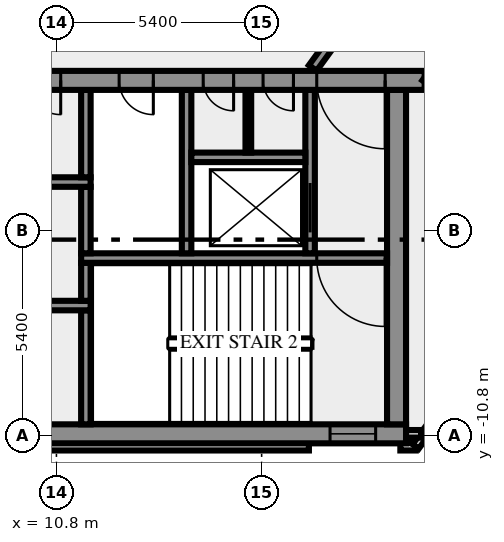
"""IFC4 building model, lengths in metres.
Left out: names, types, materials, properties, quantities, classifications, styles, units other than length and angle.
Written with IfcOpenShell. Run it as: python <this file> out.ifc"""

import sys

from ifc_helpers import new_model, si_unit, direction, frame, frame_2d, origin, place, context, subcontext, project, spatial, rectangle, extrude, element, fill, save


model = new_model("IFC4")
c1 = context("Model", 3, precision=1e-05, world=origin(), true_north=direction((0.0, 1.0)))
c2 = subcontext(c1, "Body", "Model", "MODEL_VIEW")
j1 = project(units=[si_unit("LENGTHUNIT", "METRE"), si_unit("PLANEANGLEUNIT", "RADIAN")], contexts=[c1])
p1 = place(None, origin())
s1 = spatial("IfcSite", under=j1, at=p1, CompositionType="ELEMENT")
p2 = place(p1, origin())
s2 = spatial("IfcBuilding", under=s1, at=p2, CompositionType="ELEMENT")
p3 = place(p2, frame((0.0, 0.0, 293.0)))
s3 = spatial("IfcBuildingStorey", under=s2, at=p3, CompositionType="ELEMENT", Elevation=293.0)
p4 = place(p3, frame((-17.444, -11.088, 0.0), z_axis=(0.0, 0.0, 1.0), x_axis=(1.0, 0.0, 0.0)))
e1 = element("IfcWall", 1, at=p4, inside=s3, PredefinedType="SOLIDWALL", context=c2, shape_type="SweptSolid", body=[
    extrude(rectangle(XDim=34.888, YDim=0.2, at=frame_2d((17.444, 0.0))), origin(), (0.0, 0.0, 1.0), 3.65),
])
p5 = place(p3, frame((19.85, -11.088, 0.0), z_axis=(0.0, 0.0, 1.0), x_axis=(1.0, 0.0, 0.0)))
e2 = element("IfcWall", 2, at=p5, inside=s3, PredefinedType="SOLIDWALL", context=c2, shape_type="SweptSolid", body=[
    extrude(rectangle(XDim=0.406, YDim=0.2, at=frame_2d((0.203, 0.0))), origin(), (0.0, 0.0, 1.0), 3.65),
])
p6 = place(p3, frame((20.253, -11.083, 0.0), z_axis=(0.0, 0.0, 1.0), x_axis=(0.587766567315, 0.809030569476, 0.0)))
e3 = element("IfcWall", 3, at=p6, inside=s3, PredefinedType="SOLIDWALL", context=c2, shape_type="SweptSolid", body=[
    extrude(rectangle(XDim=2.688, YDim=0.2, at=frame_2d((1.344, 0.0))), origin(), (0.0, 0.0, 1.0), 3.65),
])
p7 = place(p3, frame((19.98, -10.75, 0.0), z_axis=(0.0, 0.0, 1.0), x_axis=(1.0, 0.0, 0.0)))
e4 = element("IfcWall", 4, at=p7, inside=s3, PredefinedType="SOLIDWALL", context=c2, shape_type="SweptSolid", body=[
    extrude(rectangle(XDim=0.417, YDim=0.2, at=frame_2d((0.208, 0.0))), origin(), (0.0, 0.0, 1.0), 3.65),
])
p8 = place(p3, frame((-20.0, -10.75, 0.0), z_axis=(0.0, 0.0, 1.0), x_axis=(1.0, 0.0, 0.0)))
e5 = element("IfcWall", 5, at=p8, inside=s3, PredefinedType="SHEAR", context=c2, shape_type="SweptSolid", body=[
    extrude(rectangle(XDim=40.0, YDim=0.5, at=frame_2d((20.0, 0.0))), origin(), (0.0, 0.0, 1.0), 3.65),
])
p9 = place(p8, frame((0.8, 0.0, 1.0)))
e6 = element("IfcOpeningElement", 6, at=p9, cuts=e5, PredefinedType="OPENING", context=c2, shape_type="SweptSolid", body=[
    extrude(rectangle(XDim=1.2, YDim=1.2, at=frame_2d((0.6, 0.6))), frame((0.0, 0.26, 0.0), z_axis=(0.0, -1.0, 0.0), x_axis=(1.0, 0.0, 0.0)), (0.0, 0.0, 1.0), 0.52),
])
p10 = place(p8, frame((38.0, 0.0, 1.0)))
e7 = element("IfcOpeningElement", 7, at=p10, cuts=e5, PredefinedType="OPENING", context=c2, shape_type="SweptSolid", body=[
    extrude(rectangle(XDim=1.2, YDim=1.2, at=frame_2d((0.6, 0.6))), frame((0.0, 0.26, 0.0), z_axis=(0.0, -1.0, 0.0), x_axis=(1.0, 0.0, 0.0)), (0.0, 0.0, 1.0), 0.52),
])
p11 = place(p3, frame((11.575, -10.5, 0.0), z_axis=(0.0, 0.0, 1.0), x_axis=(0.0, 1.0, 0.0)))
e8 = element("IfcWall", 8, at=p11, inside=s3, PredefinedType="SHEAR", context=c2, shape_type="SweptSolid", body=[
    extrude(rectangle(XDim=3.0, YDim=0.25, at=frame_2d((1.5, 0.0))), origin(), (0.0, 0.0, 1.0), 3.65),
])
p12 = place(p3, frame((19.75, -10.5, 0.0), z_axis=(0.0, 0.0, 1.0), x_axis=(0.0, 1.0, 0.0)))
e9 = element("IfcWall", 9, at=p12, inside=s3, PredefinedType="SHEAR", context=c2, shape_type="SweptSolid", body=[
    extrude(rectangle(XDim=8.8, YDim=0.5, at=frame_2d((4.4, 0.0))), origin(), (0.0, 0.0, 1.0), 3.65),
])
p13 = place(p3, frame((11.7, -7.375, 0.0), z_axis=(0.0, 0.0, 1.0), x_axis=(-1.0, 0.0, 0.0)))
e10 = element("IfcWall", 10, at=p13, inside=s3, PredefinedType="SHEAR", context=c2, shape_type="SweptSolid", body=[
    extrude(rectangle(XDim=23.4, YDim=0.25, at=frame_2d((11.7, 0.0))), origin(), (0.0, 0.0, 1.0), 3.65),
])
p14 = place(p13, frame((22.225, 0.0, 0.0)))
e11 = element("IfcOpeningElement", 11, at=p14, cuts=e10, PredefinedType="OPENING", context=c2, shape_type="SweptSolid", body=[
    extrude(rectangle(XDim=0.8, YDim=2.1, at=frame_2d((0.4, 1.05))), frame((0.0, 0.135, 0.0), z_axis=(0.0, -1.0, 0.0), x_axis=(1.0, 0.0, 0.0)), (0.0, 0.0, 1.0), 0.27),
])
p15 = place(p13, frame((20.2, 0.0, 0.0)))
e12 = element("IfcOpeningElement", 12, at=p15, cuts=e10, PredefinedType="OPENING", context=c2, shape_type="SweptSolid", body=[
    extrude(rectangle(XDim=1.1, YDim=2.1, at=frame_2d((0.55, 1.05))), frame((0.0, 0.135, 0.0), z_axis=(0.0, -1.0, 0.0), x_axis=(1.0, 0.0, 0.0)), (0.0, 0.0, 1.0), 0.27),
])
p16 = place(p13, frame((17.7, 0.0, 0.0)))
e13 = element("IfcOpeningElement", 13, at=p16, cuts=e10, PredefinedType="OPENING", context=c2, shape_type="SweptSolid", body=[
    extrude(rectangle(XDim=1.1, YDim=2.1, at=frame_2d((0.55, 1.05))), frame((0.0, 0.135, 0.0), z_axis=(0.0, -1.0, 0.0), x_axis=(1.0, 0.0, 0.0)), (0.0, 0.0, 1.0), 0.27),
])
p17 = place(p13, frame((15.975, 0.0, 0.0)))
e14 = element("IfcOpeningElement", 14, at=p17, cuts=e10, PredefinedType="OPENING", context=c2, shape_type="SweptSolid", body=[
    extrude(rectangle(XDim=0.8, YDim=2.1, at=frame_2d((0.4, 1.05))), frame((0.0, 0.135, 0.0), z_axis=(0.0, -1.0, 0.0), x_axis=(1.0, 0.0, 0.0)), (0.0, 0.0, 1.0), 0.27),
])
p18 = place(p13, frame((14.5, 0.0, 0.0)))
e15 = element("IfcOpeningElement", 15, at=p18, cuts=e10, PredefinedType="OPENING", context=c2, shape_type="SweptSolid", body=[
    extrude(rectangle(XDim=0.9, YDim=2.1, at=frame_2d((0.45, 1.05))), frame((0.0, 0.135, 0.0), z_axis=(0.0, -1.0, 0.0), x_axis=(1.0, 0.0, 0.0)), (0.0, 0.0, 1.0), 0.27),
])
p19 = place(p13, frame((12.95, 0.0, 0.0)))
e16 = element("IfcOpeningElement", 16, at=p19, cuts=e10, PredefinedType="OPENING", context=c2, shape_type="SweptSolid", body=[
    extrude(rectangle(XDim=0.9, YDim=2.1, at=frame_2d((0.45, 1.05))), frame((0.0, 0.135, 0.0), z_axis=(0.0, -1.0, 0.0), x_axis=(1.0, 0.0, 0.0)), (0.0, 0.0, 1.0), 0.27),
])
p20 = place(p13, frame((11.475, 0.0, 0.0)))
e17 = element("IfcOpeningElement", 17, at=p20, cuts=e10, PredefinedType="OPENING", context=c2, shape_type="SweptSolid", body=[
    extrude(rectangle(XDim=0.9, YDim=2.1, at=frame_2d((0.45, 1.05))), frame((0.0, 0.135, 0.0), z_axis=(0.0, -1.0, 0.0), x_axis=(1.0, 0.0, 0.0)), (0.0, 0.0, 1.0), 0.27),
])
p21 = place(p13, frame((10.45, 0.0, 0.0)))
e18 = element("IfcOpeningElement", 18, at=p21, cuts=e10, PredefinedType="OPENING", context=c2, shape_type="SweptSolid", body=[
    extrude(rectangle(XDim=0.5, YDim=2.1, at=frame_2d((0.25, 1.05))), frame((0.0, 0.135, 0.0), z_axis=(0.0, -1.0, 0.0), x_axis=(1.0, 0.0, 0.0)), (0.0, 0.0, 1.0), 0.27),
])
p22 = place(p13, frame((7.987, 0.0, 0.0)))
e19 = element("IfcOpeningElement", 19, at=p22, cuts=e10, PredefinedType="OPENING", context=c2, shape_type="SweptSolid", body=[
    extrude(rectangle(XDim=0.9, YDim=2.1, at=frame_2d((0.45, 1.05))), frame((0.0, 0.135, 0.0), z_axis=(0.0, -1.0, 0.0), x_axis=(1.0, 0.0, 0.0)), (0.0, 0.0, 1.0), 0.27),
])
p23 = place(p13, frame((3.012, 0.0, 0.0)))
e20 = element("IfcOpeningElement", 20, at=p23, cuts=e10, PredefinedType="OPENING", context=c2, shape_type="SweptSolid", body=[
    extrude(rectangle(XDim=0.9, YDim=2.1, at=frame_2d((0.45, 1.05))), frame((0.0, 0.135, 0.0), z_axis=(0.0, -1.0, 0.0), x_axis=(1.0, 0.0, 0.0)), (0.0, 0.0, 1.0), 0.27),
])
p24 = place(p3, frame((11.575, -7.25, 0.0), z_axis=(0.0, 0.0, 1.0), x_axis=(0.0, 1.0, 0.0)))
e21 = element("IfcWall", 21, at=p24, inside=s3, PredefinedType="SHEAR", context=c2, shape_type="SweptSolid", body=[
    extrude(rectangle(XDim=1.0, YDim=0.25, at=frame_2d((0.5, 0.0))), origin(), (0.0, 0.0, 1.0), 3.65),
])
p25 = place(p3, frame((19.5, -6.125, 0.0), z_axis=(0.0, 0.0, 1.0), x_axis=(-1.0, 0.0, 0.0)))
e22 = element("IfcWall", 22, at=p25, inside=s3, PredefinedType="SHEAR", context=c2, shape_type="SweptSolid", body=[
    extrude(rectangle(XDim=8.05, YDim=0.25, at=frame_2d((4.025, 0.0))), origin(), (0.0, 0.0, 1.0), 3.65),
])
p26 = place(p25, frame((0.05, 0.0, 0.0)))
e23 = element("IfcOpeningElement", 23, at=p26, cuts=e22, PredefinedType="OPENING", context=c2, shape_type="SweptSolid", body=[
    extrude(rectangle(XDim=1.8, YDim=2.1, at=frame_2d((0.9, 1.05))), frame((0.0, 0.135, 0.0), z_axis=(0.0, -1.0, 0.0), x_axis=(1.0, 0.0, 0.0)), (0.0, 0.0, 1.0), 0.27),
])
p27 = place(p3, frame((11.575, -6.0, 0.0), z_axis=(0.0, 0.0, 1.0), x_axis=(0.0, 1.0, 0.0)))
e24 = element("IfcWall", 24, at=p27, inside=s3, PredefinedType="SHEAR", context=c2, shape_type="SweptSolid", body=[
    extrude(rectangle(XDim=1.75, YDim=0.25, at=frame_2d((0.875, 0.0))), origin(), (0.0, 0.0, 1.0), 3.65),
])
p28 = place(p3, frame((14.225, -6.0, 0.0), z_axis=(0.0, 0.0, 1.0), x_axis=(0.0, 1.0, 0.0)))
e25 = element("IfcWall", 25, at=p28, inside=s3, PredefinedType="SHEAR", context=c2, shape_type="SweptSolid", body=[
    extrude(rectangle(XDim=4.3, YDim=0.25, at=frame_2d((2.15, 0.0))), origin(), (0.0, 0.0, 1.0), 3.65),
])
p29 = place(p3, frame((17.475, -6.0, 0.0), z_axis=(0.0, 0.0, 1.0), x_axis=(0.0, 1.0, 0.0)))
e26 = element("IfcWall", 26, at=p29, inside=s3, PredefinedType="SHEAR", context=c2, shape_type="SweptSolid", body=[
    extrude(rectangle(XDim=4.3, YDim=0.25, at=frame_2d((2.15, 0.0))), origin(), (0.0, 0.0, 1.0), 3.65),
])
p30 = place(p29, frame((0.55, 0.0, 0.0)))
e27 = element("IfcOpeningElement", 27, at=p30, cuts=e26, PredefinedType="OPENING", context=c2, shape_type="SweptSolid", body=[
    extrude(rectangle(XDim=1.3, YDim=2.1, at=frame_2d((0.65, 1.05))), frame((0.0, 0.135, 0.0), z_axis=(0.0, -1.0, 0.0), x_axis=(1.0, 0.0, 0.0)), (0.0, 0.0, 1.0), 0.27),
])
p31 = place(p3, frame((-0.6, -4.125, 0.0), z_axis=(0.0, 0.0, 1.0), x_axis=(1.0, 0.0, 0.0)))
e28 = element("IfcWall", 28, at=p31, inside=s3, PredefinedType="SHEAR", context=c2, shape_type="SweptSolid", body=[
    extrude(rectangle(XDim=12.3, YDim=0.25, at=frame_2d((6.15, 0.0))), origin(), (0.0, 0.0, 1.0), 3.65),
])
p32 = place(p31, frame((2.75, 0.0, 0.0)))
e29 = element("IfcOpeningElement", 29, at=p32, cuts=e28, PredefinedType="OPENING", context=c2, shape_type="SweptSolid", body=[
    extrude(rectangle(XDim=1.3, YDim=2.1, at=frame_2d((0.65, 1.05))), frame((0.0, 0.135, 0.0), z_axis=(0.0, -1.0, 0.0), x_axis=(1.0, 0.0, 0.0)), (0.0, 0.0, 1.0), 0.27),
])
p33 = place(p3, frame((11.575, -4.0, 0.0), z_axis=(0.0, 0.0, 1.0), x_axis=(0.0, 1.0, 0.0)))
e30 = element("IfcWall", 30, at=p33, inside=s3, PredefinedType="SHEAR", context=c2, shape_type="SweptSolid", body=[
    extrude(rectangle(XDim=2.3, YDim=0.25, at=frame_2d((1.15, 0.0))), origin(), (0.0, 0.0, 1.0), 3.65),
])
p34 = place(p3, frame((14.35, -3.475, 0.0), z_axis=(0.0, 0.0, 1.0), x_axis=(1.0, 0.0, 0.0)))
e31 = element("IfcWall", 31, at=p34, inside=s3, PredefinedType="SHEAR", context=c2, shape_type="SweptSolid", body=[
    extrude(rectangle(XDim=3.0, YDim=0.25, at=frame_2d((1.5, 0.0))), origin(), (0.0, 0.0, 1.0), 3.65),
])
p35 = place(p3, frame((15.85, -3.35, 0.0), z_axis=(0.0, 0.0, 1.0), x_axis=(0.0, 1.0, 0.0)))
e32 = element("IfcWall", 32, at=p35, inside=s3, PredefinedType="PARTITIONING", context=c2, shape_type="SweptSolid", body=[
    extrude(rectangle(XDim=1.65, YDim=0.15, at=frame_2d((0.825, 0.0))), origin(), (0.0, 0.0, 1.0), 3.65),
])
p36 = place(p3, frame((20.49, -1.45, 0.0), z_axis=(0.0, 0.0, 1.0), x_axis=(-1.0, 0.0, 0.0)))
e33 = element("IfcWall", 33, at=p36, inside=s3, PredefinedType="SHEAR", context=c2, shape_type="SweptSolid", body=[
    extrude(rectangle(XDim=40.98, YDim=0.5, at=frame_2d((20.49, 0.0))), origin(), (0.0, 0.0, 1.0), 3.65),
])
p37 = place(p36, frame((38.14, 0.0, 0.0)))
e34 = element("IfcOpeningElement", 34, at=p37, cuts=e33, PredefinedType="OPENING", context=c2, shape_type="SweptSolid", body=[
    extrude(rectangle(XDim=1.8, YDim=2.1, at=frame_2d((0.9, 1.05))), frame((0.0, 0.26, 0.0), z_axis=(0.0, -1.0, 0.0), x_axis=(1.0, 0.0, 0.0)), (0.0, 0.0, 1.0), 0.52),
])
p38 = place(p36, frame((35.89, 0.0, 0.0)))
e35 = element("IfcOpeningElement", 35, at=p38, cuts=e33, PredefinedType="OPENING", context=c2, shape_type="SweptSolid", body=[
    extrude(rectangle(XDim=0.9, YDim=2.1, at=frame_2d((0.45, 1.05))), frame((0.0, 0.26, 0.0), z_axis=(0.0, -1.0, 0.0), x_axis=(1.0, 0.0, 0.0)), (0.0, 0.0, 1.0), 0.52),
])
p39 = place(p36, frame((32.94, 0.0, 0.0)))
e36 = element("IfcOpeningElement", 36, at=p39, cuts=e33, PredefinedType="OPENING", context=c2, shape_type="SweptSolid", body=[
    extrude(rectangle(XDim=0.9, YDim=2.1, at=frame_2d((0.45, 1.05))), frame((0.0, 0.26, 0.0), z_axis=(0.0, -1.0, 0.0), x_axis=(1.0, 0.0, 0.0)), (0.0, 0.0, 1.0), 0.52),
])
p40 = place(p36, frame((31.015, 0.0, 0.0)))
e37 = element("IfcOpeningElement", 37, at=p40, cuts=e33, PredefinedType="OPENING", context=c2, shape_type="SweptSolid", body=[
    extrude(rectangle(XDim=0.8, YDim=2.1, at=frame_2d((0.4, 1.05))), frame((0.0, 0.26, 0.0), z_axis=(0.0, -1.0, 0.0), x_axis=(1.0, 0.0, 0.0)), (0.0, 0.0, 1.0), 0.52),
])
p41 = place(p36, frame((24.765, 0.0, 0.0)))
e38 = element("IfcOpeningElement", 38, at=p41, cuts=e33, PredefinedType="OPENING", context=c2, shape_type="SweptSolid", body=[
    extrude(rectangle(XDim=0.8, YDim=2.1, at=frame_2d((0.4, 1.05))), frame((0.0, 0.26, 0.0), z_axis=(0.0, -1.0, 0.0), x_axis=(1.0, 0.0, 0.0)), (0.0, 0.0, 1.0), 0.52),
])
p42 = place(p36, frame((21.765, 0.0, 0.0)))
e39 = element("IfcOpeningElement", 39, at=p42, cuts=e33, PredefinedType="OPENING", context=c2, shape_type="SweptSolid", body=[
    extrude(rectangle(XDim=2.0, YDim=2.1, at=frame_2d((1.0, 1.05))), frame((0.0, 0.26, 0.0), z_axis=(0.0, -1.0, 0.0), x_axis=(1.0, 0.0, 0.0)), (0.0, 0.0, 1.0), 0.52),
])
p43 = place(p36, frame((15.202, 0.0, 0.0)))
e40 = element("IfcOpeningElement", 40, at=p43, cuts=e33, PredefinedType="OPENING", context=c2, shape_type="SweptSolid", body=[
    extrude(rectangle(XDim=0.9, YDim=2.1, at=frame_2d((0.45, 1.05))), frame((0.0, 0.26, 0.0), z_axis=(0.0, -1.0, 0.0), x_axis=(1.0, 0.0, 0.0)), (0.0, 0.0, 1.0), 0.52),
])
p44 = place(p36, frame((13.54, 0.0, 0.0)))
e41 = element("IfcOpeningElement", 41, at=p44, cuts=e33, PredefinedType="OPENING", context=c2, shape_type="SweptSolid", body=[
    extrude(rectangle(XDim=0.9, YDim=2.1, at=frame_2d((0.45, 1.05))), frame((0.0, 0.26, 0.0), z_axis=(0.0, -1.0, 0.0), x_axis=(1.0, 0.0, 0.0)), (0.0, 0.0, 1.0), 0.52),
])
p45 = place(p36, frame((11.64, 0.0, 0.0)))
e42 = element("IfcOpeningElement", 42, at=p45, cuts=e33, PredefinedType="OPENING", context=c2, shape_type="SweptSolid", body=[
    extrude(rectangle(XDim=0.9, YDim=2.1, at=frame_2d((0.45, 1.05))), frame((0.0, 0.26, 0.0), z_axis=(0.0, -1.0, 0.0), x_axis=(1.0, 0.0, 0.0)), (0.0, 0.0, 1.0), 0.52),
])
p46 = place(p36, frame((9.577, 0.0, 0.0)))
e43 = element("IfcOpeningElement", 43, at=p46, cuts=e33, PredefinedType="OPENING", context=c2, shape_type="SweptSolid", body=[
    extrude(rectangle(XDim=0.9, YDim=2.1, at=frame_2d((0.45, 1.05))), frame((0.0, 0.26, 0.0), z_axis=(0.0, -1.0, 0.0), x_axis=(1.0, 0.0, 0.0)), (0.0, 0.0, 1.0), 0.52),
])
p47 = place(p36, frame((7.14, 0.0, 0.0)))
e44 = element("IfcOpeningElement", 44, at=p47, cuts=e33, PredefinedType="OPENING", context=c2, shape_type="SweptSolid", body=[
    extrude(rectangle(XDim=0.9, YDim=2.1, at=frame_2d((0.45, 1.05))), frame((0.0, 0.26, 0.0), z_axis=(0.0, -1.0, 0.0), x_axis=(1.0, 0.0, 0.0)), (0.0, 0.0, 1.0), 0.52),
])
p48 = place(p36, frame((5.028, 0.0, 0.0)))
e45 = element("IfcOpeningElement", 45, at=p48, cuts=e33, PredefinedType="OPENING", context=c2, shape_type="SweptSolid", body=[
    extrude(rectangle(XDim=0.8, YDim=2.1, at=frame_2d((0.4, 1.05))), frame((0.0, 0.26, 0.0), z_axis=(0.0, -1.0, 0.0), x_axis=(1.0, 0.0, 0.0)), (0.0, 0.0, 1.0), 0.52),
])
p49 = place(p36, frame((3.452, 0.0, 0.0)))
e46 = element("IfcOpeningElement", 46, at=p49, cuts=e33, PredefinedType="OPENING", context=c2, shape_type="SweptSolid", body=[
    extrude(rectangle(XDim=0.8, YDim=2.1, at=frame_2d((0.4, 1.05))), frame((0.0, 0.26, 0.0), z_axis=(0.0, -1.0, 0.0), x_axis=(1.0, 0.0, 0.0)), (0.0, 0.0, 1.0), 0.52),
])
p50 = place(p36, frame((1.04, 0.0, 0.0)))
e47 = element("IfcOpeningElement", 47, at=p50, cuts=e33, PredefinedType="OPENING", context=c2, shape_type="SweptSolid", body=[
    extrude(rectangle(XDim=1.8, YDim=2.1, at=frame_2d((0.9, 1.05))), frame((0.0, 0.26, 0.0), z_axis=(0.0, -1.0, 0.0), x_axis=(1.0, 0.0, 0.0)), (0.0, 0.0, 1.0), 0.52),
])
p51 = place(p3, frame((17.545, -1.125, 0.0), z_axis=(0.0, 0.0, 1.0), x_axis=(0.58779555165, 0.809009511354, 0.0)))
e48 = element("IfcWall", 48, at=p51, inside=s3, PredefinedType="SOLIDWALL", context=c2, shape_type="SweptSolid", body=[
    extrude(rectangle(XDim=18.103, YDim=0.25, at=frame_2d((9.052, 0.0))), origin(), (0.0, 0.0, 1.0), 3.65),
])
p52 = place(p51, frame((3.441, 0.0, 0.0)))
e49 = element("IfcOpeningElement", 49, at=p52, cuts=e48, PredefinedType="OPENING", context=c2, shape_type="SweptSolid", body=[
    extrude(rectangle(XDim=0.9, YDim=2.1, at=frame_2d((0.45, 1.05))), frame((0.0, 0.135, 0.0), z_axis=(0.0, -1.0, 0.0), x_axis=(1.0, 0.0, 0.0)), (0.0, 0.0, 1.0), 0.27),
])
p53 = place(p3, frame((30.183, 11.761, 0.0), z_axis=(0.0, 0.0, 1.0), x_axis=(-0.587781762867, -0.80901952958, 0.0)))
e50 = element("IfcWall", 50, at=p53, inside=s3, PredefinedType="SOLIDWALL", context=c2, shape_type="SweptSolid", body=[
    extrude(rectangle(XDim=16.42, YDim=0.25, at=frame_2d((8.21, 0.0))), origin(), (0.0, 0.0, 1.0), 3.65),
])
p54 = place(p53, frame((0.225, 0.0, 0.0)))
e51 = element("IfcOpeningElement", 51, at=p54, cuts=e50, PredefinedType="OPENING", context=c2, shape_type="SweptSolid", body=[
    extrude(rectangle(XDim=0.9, YDim=2.1, at=frame_2d((0.45, 1.05))), frame((0.0, 0.135, 0.0), z_axis=(0.0, -1.0, 0.0), x_axis=(1.0, 0.0, 0.0)), (0.0, 0.0, 1.0), 0.27),
])
p55 = place(p10, origin())
e52 = element("IfcWindow", 52, at=p55, inside=s3, PartitioningType="SINGLE_PANEL", PredefinedType="WINDOW", context=c2, shape_type="SweptSolid", body=[
    extrude(rectangle(XDim=1.2, YDim=1.2, at=frame_2d((0.6, 0.6))), frame((0.0, 0.03, 0.0), z_axis=(0.0, -1.0, 0.0), x_axis=(1.0, 0.0, 0.0)), (0.0, 0.0, 1.0), 0.06),
])
fill(e7, e52)
p56 = place(p26, origin())
e53 = element("IfcDoor", 53, at=p56, inside=s3, OperationType="DOUBLE_DOOR_SINGLE_SWING", PredefinedType="DOOR", context=c2, shape_type="SweptSolid", body=[
    extrude(rectangle(XDim=1.8, YDim=2.1, at=frame_2d((0.9, 1.05))), frame((0.0, 0.025, 0.0), z_axis=(0.0, -1.0, 0.0), x_axis=(1.0, 0.0, 0.0)), (0.0, 0.0, 1.0), 0.05),
])
fill(e23, e53)
p57 = place(p30, origin())
e54 = element("IfcDoor", 54, at=p57, inside=s3, OperationType="DOUBLE_DOOR_SLIDING", PredefinedType="DOOR", context=c2, shape_type="SweptSolid", body=[
    extrude(rectangle(XDim=1.3, YDim=2.1, at=frame_2d((0.65, 1.05))), frame((0.0, 0.025, 0.0), z_axis=(0.0, -1.0, 0.0), x_axis=(1.0, 0.0, 0.0)), (0.0, 0.0, 1.0), 0.05),
])
fill(e27, e54)
p58 = place(p46, origin())
e55 = element("IfcDoor", 55, at=p58, inside=s3, OperationType="SINGLE_SWING_LEFT", PredefinedType="DOOR", context=c2, shape_type="SweptSolid", body=[
    extrude(rectangle(XDim=0.9, YDim=2.1, at=frame_2d((0.45, 1.05))), frame((0.0, 0.025, 0.0), z_axis=(0.0, -1.0, 0.0), x_axis=(1.0, 0.0, 0.0)), (0.0, 0.0, 1.0), 0.05),
])
fill(e43, e55)
p59 = place(p47, origin())
e56 = element("IfcDoor", 56, at=p59, inside=s3, OperationType="SINGLE_SWING_LEFT", PredefinedType="DOOR", context=c2, shape_type="SweptSolid", body=[
    extrude(rectangle(XDim=0.9, YDim=2.1, at=frame_2d((0.45, 1.05))), frame((0.0, 0.025, 0.0), z_axis=(0.0, -1.0, 0.0), x_axis=(1.0, 0.0, 0.0)), (0.0, 0.0, 1.0), 0.05),
])
fill(e44, e56)
p60 = place(p48, origin())
e57 = element("IfcDoor", 57, at=p60, inside=s3, OperationType="SINGLE_SWING_LEFT", PredefinedType="DOOR", context=c2, shape_type="SweptSolid", body=[
    extrude(rectangle(XDim=0.8, YDim=2.1, at=frame_2d((0.4, 1.05))), frame((0.0, 0.025, 0.0), z_axis=(0.0, -1.0, 0.0), x_axis=(1.0, 0.0, 0.0)), (0.0, 0.0, 1.0), 0.05),
])
fill(e45, e57)
p61 = place(p49, origin())
e58 = element("IfcDoor", 58, at=p61, inside=s3, OperationType="SINGLE_SWING_LEFT", PredefinedType="DOOR", context=c2, shape_type="SweptSolid", body=[
    extrude(rectangle(XDim=0.8, YDim=2.1, at=frame_2d((0.4, 1.05))), frame((0.0, 0.025, 0.0), z_axis=(0.0, -1.0, 0.0), x_axis=(1.0, 0.0, 0.0)), (0.0, 0.0, 1.0), 0.05),
])
fill(e46, e58)
p62 = place(p50, origin())
e59 = element("IfcDoor", 59, at=p62, inside=s3, OperationType="DOUBLE_DOOR_SINGLE_SWING", PredefinedType="DOOR", context=c2, shape_type="SweptSolid", body=[
    extrude(rectangle(XDim=1.8, YDim=2.1, at=frame_2d((0.9, 1.05))), frame((0.0, 0.025, 0.0), z_axis=(0.0, -1.0, 0.0), x_axis=(1.0, 0.0, 0.0)), (0.0, 0.0, 1.0), 0.05),
])
fill(e47, e59)
save(model, sys.argv[1])
